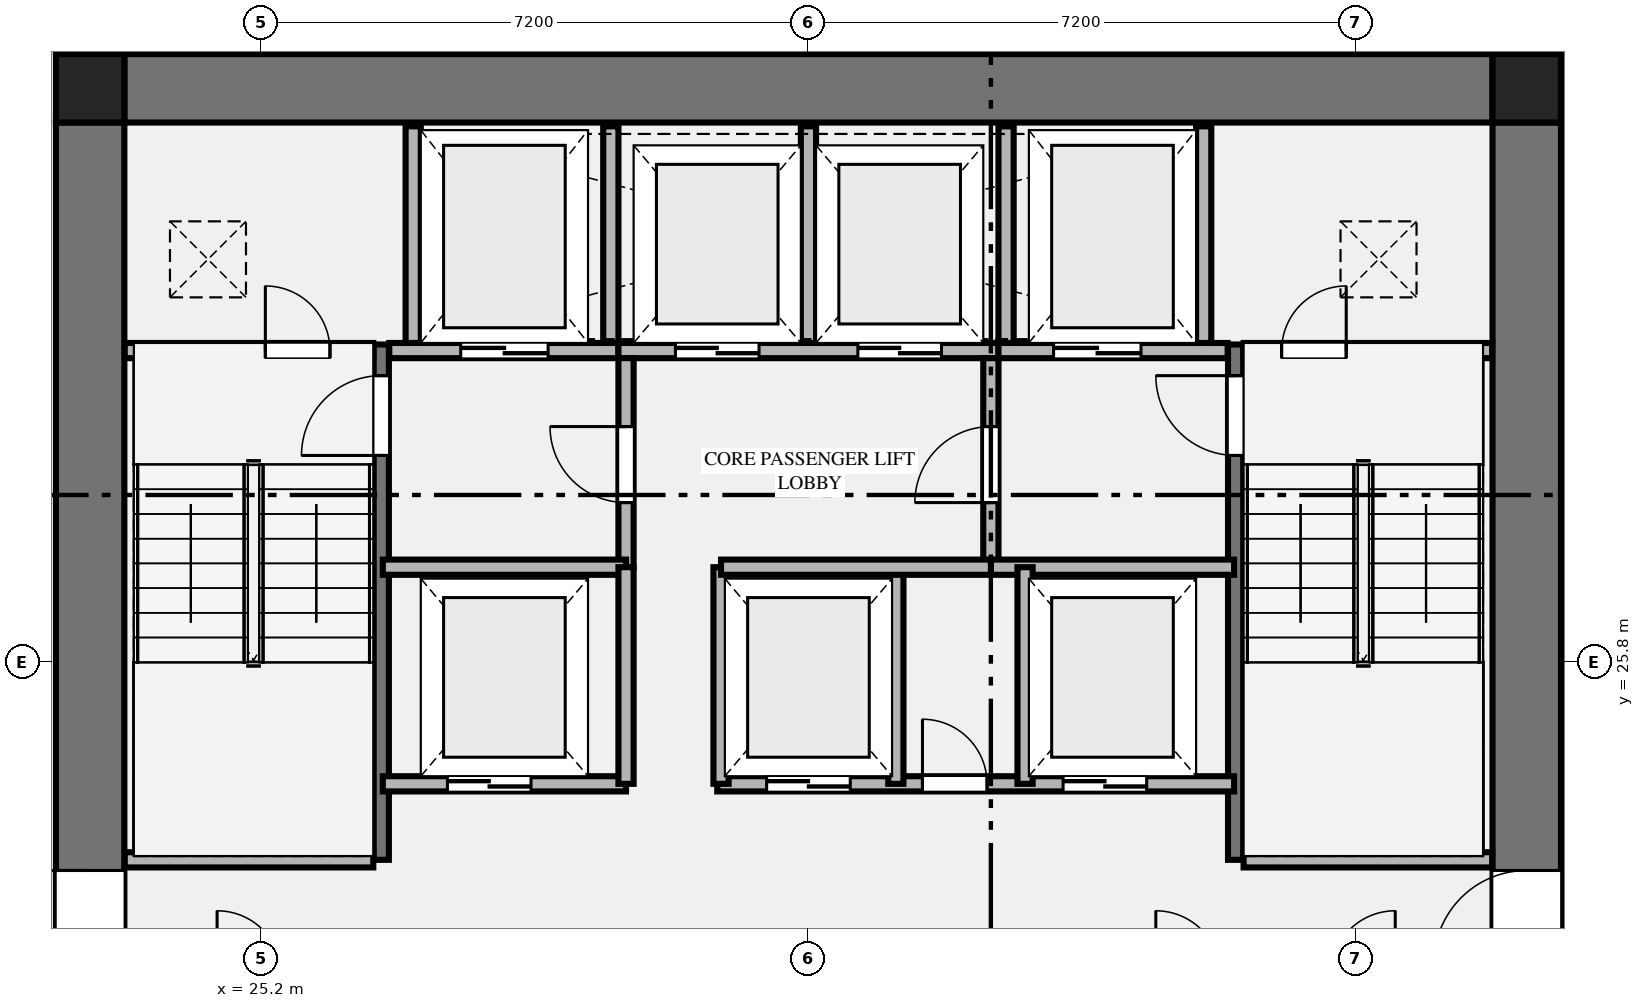
"""IFC4 building model, lengths in metres.
Left out: names, types, materials, properties, quantities, classifications, styles, units other than length and angle.
Written with IfcOpenShell. Run it as: python <this file> out.ifc"""

import sys

from ifc_helpers import new_model, si_unit, direction, frame, frame_2d, origin, origin_2d, place, context, subcontext, project, spatial, rectangle, extrude, element, fill, save


model = new_model("IFC4")
c1 = context("Model", 3, precision=1e-05, world=origin(), true_north=direction((0.0, 1.0)))
c2 = subcontext(c1, "Body", "Model", "MODEL_VIEW")
j1 = project(units=[si_unit("LENGTHUNIT", "METRE"), si_unit("PLANEANGLEUNIT", "RADIAN")], contexts=[c1])
p1 = place(None, origin())
s1 = spatial("IfcSite", under=j1, at=p1, CompositionType="ELEMENT")
p2 = place(p1, origin())
s2 = spatial("IfcBuilding", under=s1, at=p2, CompositionType="ELEMENT")
p3 = place(p2, origin())
s3 = spatial("IfcBuildingStorey", under=s2, at=p3, CompositionType="ELEMENT", Elevation=0.0)
for number, where, z_axis, x_axis in (
    (1, (41.85, 33.35, 0.0), (0.0, 0.0, 1.0), (1.0, 0.0, 0.0)),
    (2, (22.95, 33.35, 0.0), (0.0, 0.0, 1.0), (1.0, 0.0, 0.0)),
):
    element("IfcColumn", number, at=place(p3, frame(where, z_axis=z_axis, x_axis=x_axis)), inside=s3, PredefinedType="COLUMN", context=c2, shape_type="SweptSolid", body=[
        extrude(rectangle(XDim=0.9, YDim=0.9, at=origin_2d()), origin(), (0.0, 0.0, 1.0), 6.0),
    ])
p4 = place(p3, frame((23.4, 33.35, 0.0), z_axis=(0.0, 0.0, 1.0), x_axis=(1.0, 0.0, 0.0)))
e3 = element("IfcWall", 3, at=p4, inside=s3, PredefinedType="SHEAR", context=c2, shape_type="SweptSolid", body=[
    extrude(rectangle(XDim=18.0, YDim=0.9, at=frame_2d((9.0, 0.0))), origin(), (0.0, 0.0, 1.0), 5.75),
])
p5 = place(p3, frame((22.95, 18.9, 0.0), z_axis=(0.0, 0.0, 1.0), x_axis=(0.0, 1.0, 0.0)))
e4 = element("IfcWall", 4, at=p5, inside=s3, PredefinedType="SHEAR", context=c2, shape_type="SweptSolid", body=[
    extrude(rectangle(XDim=14.0, YDim=0.9, at=frame_2d((7.0, 0.0))), origin(), (0.0, 0.0, 1.0), 5.75),
])
p6 = place(p5, frame((2.94, 0.0, 0.0)))
e5 = element("IfcOpeningElement", 5, at=p6, cuts=e4, PredefinedType="OPENING", context=c2, shape_type="SweptSolid", body=[
    extrude(rectangle(XDim=1.22, YDim=2.25, at=frame_2d((0.61, 1.125))), frame((0.0, 0.46, 0.0), z_axis=(0.0, -1.0, 0.0), x_axis=(1.0, 0.0, 0.0)), (0.0, 0.0, 1.0), 0.92),
])
p7 = place(p3, frame((41.85, 18.9, 0.0), z_axis=(0.0, 0.0, 1.0), x_axis=(0.0, 1.0, 0.0)))
e6 = element("IfcWall", 6, at=p7, inside=s3, PredefinedType="SHEAR", context=c2, shape_type="SweptSolid", body=[
    extrude(rectangle(XDim=14.0, YDim=0.9, at=frame_2d((7.0, 0.0))), origin(), (0.0, 0.0, 1.0), 5.75),
])
p8 = place(p7, frame((2.94, 0.0, 0.0)))
e7 = element("IfcOpeningElement", 7, at=p8, cuts=e6, PredefinedType="OPENING", context=c2, shape_type="SweptSolid", body=[
    extrude(rectangle(XDim=1.22, YDim=2.25, at=frame_2d((0.61, 1.125))), frame((0.0, 0.46, 0.0), z_axis=(0.0, -1.0, 0.0), x_axis=(1.0, 0.0, 0.0)), (0.0, 0.0, 1.0), 0.92),
])
p9 = place(p3, frame((26.78, 23.2, 0.0), z_axis=(0.0, 0.0, 1.0), x_axis=(0.0, 1.0, 0.0)))
e8 = element("IfcWall", 8, at=p9, inside=s3, PredefinedType="SHEAR", context=c2, shape_type="SweptSolid", body=[
    extrude(rectangle(XDim=6.78, YDim=0.2, at=frame_2d((3.39, 0.0))), origin(), (0.0, 0.0, 1.0), 6.0),
])
p10 = place(p9, frame((5.32, 0.0, 0.0)))
e9 = element("IfcOpeningElement", 9, at=p10, cuts=e8, PredefinedType="OPENING", context=c2, shape_type="SweptSolid", body=[
    extrude(rectangle(XDim=1.05, YDim=2.15, at=frame_2d((0.525, 1.075))), frame((0.0, 0.11, 0.0), z_axis=(0.0, -1.0, 0.0), x_axis=(1.0, 0.0, 0.0)), (0.0, 0.0, 1.0), 0.22),
])
p11 = place(p3, frame((23.405, 23.2, 0.0), z_axis=(0.0, 0.0, 1.0), x_axis=(1.0, 0.0, 0.0)))
e10 = element("IfcWall", 10, at=p11, inside=s3, PredefinedType="PLUMBINGWALL", context=c2, shape_type="SweptSolid", body=[
    extrude(rectangle(XDim=3.27, YDim=0.2, at=frame_2d((1.635, 0.0))), origin(), (0.0, 0.0, 1.0), 5.75),
])
p12 = place(p3, frame((38.02, 23.2, 0.0), z_axis=(0.0, 0.0, 1.0), x_axis=(0.0, 1.0, 0.0)))
e11 = element("IfcWall", 11, at=p12, inside=s3, PredefinedType="SHEAR", context=c2, shape_type="SweptSolid", body=[
    extrude(rectangle(XDim=6.78, YDim=0.2, at=frame_2d((3.39, 0.0))), origin(), (0.0, 0.0, 1.0), 6.0),
])
p13 = place(p12, frame((5.32, 0.0, 0.0)))
e12 = element("IfcOpeningElement", 12, at=p13, cuts=e11, PredefinedType="OPENING", context=c2, shape_type="SweptSolid", body=[
    extrude(rectangle(XDim=1.05, YDim=2.15, at=frame_2d((0.525, 1.075))), frame((0.0, 0.11, 0.0), z_axis=(0.0, -1.0, 0.0), x_axis=(1.0, 0.0, 0.0)), (0.0, 0.0, 1.0), 0.22),
])
p14 = place(p3, frame((38.125, 23.2, 0.0), z_axis=(0.0, 0.0, 1.0), x_axis=(1.0, 0.0, 0.0)))
e13 = element("IfcWall", 13, at=p14, inside=s3, PredefinedType="PLUMBINGWALL", context=c2, shape_type="SweptSolid", body=[
    extrude(rectangle(XDim=3.27, YDim=0.2, at=frame_2d((1.635, 0.0))), origin(), (0.0, 0.0, 1.0), 5.75),
])
p15 = place(p3, frame((23.405, 29.9, 0.0), z_axis=(0.0, 0.0, 1.0), x_axis=(1.0, 0.0, 0.0)))
e14 = element("IfcWall", 14, at=p15, inside=s3, PredefinedType="PLUMBINGWALL", context=c2, shape_type="SweptSolid", body=[
    extrude(rectangle(XDim=3.27, YDim=0.2, at=frame_2d((1.635, 0.0))), origin(), (0.0, 0.0, 1.0), 5.75),
])
p16 = place(p15, frame((1.85, 0.0, 0.0)))
e15 = element("IfcOpeningElement", 15, at=p16, cuts=e14, PredefinedType="OPENING", context=c2, shape_type="SweptSolid", body=[
    extrude(rectangle(XDim=0.85, YDim=2.05, at=frame_2d((0.425, 1.025))), frame((0.0, 0.11, 0.0), z_axis=(0.0, -1.0, 0.0), x_axis=(1.0, 0.0, 0.0)), (0.0, 0.0, 1.0), 0.22),
])
p17 = place(p3, frame((26.885, 29.9, 0.0), z_axis=(0.0, 0.0, 1.0), x_axis=(1.0, 0.0, 0.0)))
e16 = element("IfcWall", 16, at=p17, inside=s3, PredefinedType="PLUMBINGWALL", context=c2, shape_type="SweptSolid", body=[
    extrude(rectangle(XDim=3.015, YDim=0.2, at=frame_2d((1.507, 0.0))), origin(), (0.0, 0.0, 1.0), 5.75),
])
p18 = place(p17, frame((0.94, 0.0, 0.0)))
e17 = element("IfcOpeningElement", 17, at=p18, cuts=e16, PredefinedType="OPENING", context=c2, shape_type="SweptSolid", body=[
    extrude(rectangle(XDim=1.15, YDim=2.2, at=frame_2d((0.575, 1.1))), frame((0.0, 0.11, 0.0), z_axis=(0.0, -1.0, 0.0), x_axis=(1.0, 0.0, 0.0)), (0.0, 0.0, 1.0), 0.22),
])
p19 = place(p3, frame((29.9, 29.9, 0.0), z_axis=(0.0, 0.0, 1.0), x_axis=(1.0, 0.0, 0.0)))
e18 = element("IfcWall", 18, at=p19, inside=s3, PredefinedType="PLUMBINGWALL", context=c2, shape_type="SweptSolid", body=[
    extrude(rectangle(XDim=5.0, YDim=0.2, at=frame_2d((2.5, 0.0))), origin(), (0.0, 0.0, 1.0), 5.75),
])
p20 = place(p19, frame((0.75, 0.0, 0.0)))
e19 = element("IfcOpeningElement", 19, at=p20, cuts=e18, PredefinedType="OPENING", context=c2, shape_type="SweptSolid", body=[
    extrude(rectangle(XDim=1.1, YDim=2.2, at=frame_2d((0.55, 1.1))), frame((0.0, 0.11, 0.0), z_axis=(0.0, -1.0, 0.0), x_axis=(1.0, 0.0, 0.0)), (0.0, 0.0, 1.0), 0.22),
])
p21 = place(p19, frame((3.15, 0.0, 0.0)))
e20 = element("IfcOpeningElement", 20, at=p21, cuts=e18, PredefinedType="OPENING", context=c2, shape_type="SweptSolid", body=[
    extrude(rectangle(XDim=1.1, YDim=2.2, at=frame_2d((0.55, 1.1))), frame((0.0, 0.11, 0.0), z_axis=(0.0, -1.0, 0.0), x_axis=(1.0, 0.0, 0.0)), (0.0, 0.0, 1.0), 0.22),
])
p22 = place(p3, frame((34.9, 29.9, 0.0), z_axis=(0.0, 0.0, 1.0), x_axis=(1.0, 0.0, 0.0)))
e21 = element("IfcWall", 21, at=p22, inside=s3, PredefinedType="PLUMBINGWALL", context=c2, shape_type="SweptSolid", body=[
    extrude(rectangle(XDim=3.015, YDim=0.2, at=frame_2d((1.508, 0.0))), origin(), (0.0, 0.0, 1.0), 5.75),
])
p23 = place(p22, frame((0.725, 0.0, 0.0)))
e22 = element("IfcOpeningElement", 22, at=p23, cuts=e21, PredefinedType="OPENING", context=c2, shape_type="SweptSolid", body=[
    extrude(rectangle(XDim=1.15, YDim=2.2, at=frame_2d((0.575, 1.1))), frame((0.0, 0.11, 0.0), z_axis=(0.0, -1.0, 0.0), x_axis=(1.0, 0.0, 0.0)), (0.0, 0.0, 1.0), 0.22),
])
p24 = place(p3, frame((38.125, 29.9, 0.0), z_axis=(0.0, 0.0, 1.0), x_axis=(1.0, 0.0, 0.0)))
e23 = element("IfcWall", 23, at=p24, inside=s3, PredefinedType="PLUMBINGWALL", context=c2, shape_type="SweptSolid", body=[
    extrude(rectangle(XDim=3.27, YDim=0.2, at=frame_2d((1.635, 0.0))), origin(), (0.0, 0.0, 1.0), 5.75),
])
p25 = place(p24, frame((0.5, 0.0, 0.0)))
e24 = element("IfcOpeningElement", 24, at=p25, cuts=e23, PredefinedType="OPENING", context=c2, shape_type="SweptSolid", body=[
    extrude(rectangle(XDim=0.85, YDim=2.05, at=frame_2d((0.425, 1.025))), frame((0.0, 0.11, 0.0), z_axis=(0.0, -1.0, 0.0), x_axis=(1.0, 0.0, 0.0)), (0.0, 0.0, 1.0), 0.22),
])
for number, where, z_axis, x_axis in (
    (25, (27.2, 30.0, 0.0), (0.0, 0.0, 1.0), (0.0, 1.0, 0.0)),
    (26, (29.8, 30.0, 0.0), (0.0, 0.0, 1.0), (0.0, 1.0, 0.0)),
    (27, (32.4, 30.0, 0.0), (0.0, 0.0, 1.0), (0.0, 1.0, 0.0)),
    (28, (35.0, 30.0, 0.0), (0.0, 0.0, 1.0), (0.0, 1.0, 0.0)),
    (29, (37.6, 30.0, 0.0), (0.0, 0.0, 1.0), (0.0, 1.0, 0.0)),
):
    element("IfcWall", number, at=place(p3, frame(where, z_axis=z_axis, x_axis=x_axis)), inside=s3, PredefinedType="PLUMBINGWALL", context=c2, shape_type="SweptSolid", body=[
        extrude(rectangle(XDim=2.85, YDim=0.2, at=frame_2d((1.425, 0.0))), origin(), (0.0, 0.0, 1.0), 5.75),
    ])
p26 = place(p3, frame((30.0, 27.05, 0.0), z_axis=(0.0, 0.0, 1.0), x_axis=(0.0, 1.0, 0.0)))
e30 = element("IfcWall", 30, at=p26, inside=s3, PredefinedType="PLUMBINGWALL", context=c2, shape_type="SweptSolid", body=[
    extrude(rectangle(XDim=2.75, YDim=0.2, at=frame_2d((1.375, 0.0))), origin(), (0.0, 0.0, 1.0), 5.75),
])
p27 = place(p26, frame((0.85, 0.0, 0.0)))
e31 = element("IfcOpeningElement", 31, at=p27, cuts=e30, PredefinedType="OPENING", context=c2, shape_type="SweptSolid", body=[
    extrude(rectangle(XDim=1.0, YDim=2.15, at=frame_2d((0.5, 1.075))), frame((0.0, 0.11, 0.0), z_axis=(0.0, -1.0, 0.0), x_axis=(1.0, 0.0, 0.0)), (0.0, 0.0, 1.0), 0.22),
])
p28 = place(p3, frame((26.8, 27.05, 0.0), z_axis=(0.0, 0.0, 1.0), x_axis=(1.0, 0.0, 0.0)))
e32 = element("IfcWall", 32, at=p28, inside=s3, PredefinedType="PLUMBINGWALL", context=c2, shape_type="SweptSolid", body=[
    extrude(rectangle(XDim=3.2, YDim=0.2, at=frame_2d((1.6, 0.0))), origin(), (0.0, 0.0, 1.0), 5.75),
])
p29 = place(p3, frame((34.8, 27.05, 0.0), z_axis=(0.0, 0.0, 1.0), x_axis=(0.0, 1.0, 0.0)))
e33 = element("IfcWall", 33, at=p29, inside=s3, PredefinedType="PLUMBINGWALL", context=c2, shape_type="SweptSolid", body=[
    extrude(rectangle(XDim=2.75, YDim=0.2, at=frame_2d((1.375, 0.0))), origin(), (0.0, 0.0, 1.0), 5.75),
])
p30 = place(p29, frame((0.85, 0.0, 0.0)))
e34 = element("IfcOpeningElement", 34, at=p30, cuts=e33, PredefinedType="OPENING", context=c2, shape_type="SweptSolid", body=[
    extrude(rectangle(XDim=1.0, YDim=2.15, at=frame_2d((0.5, 1.075))), frame((0.0, 0.11, 0.0), z_axis=(0.0, -1.0, 0.0), x_axis=(1.0, 0.0, 0.0)), (0.0, 0.0, 1.0), 0.22),
])
p31 = place(p3, frame((34.8, 27.05, 0.0), z_axis=(0.0, 0.0, 1.0), x_axis=(1.0, 0.0, 0.0)))
e35 = element("IfcWall", 35, at=p31, inside=s3, PredefinedType="PLUMBINGWALL", context=c2, shape_type="SweptSolid", body=[
    extrude(rectangle(XDim=3.2, YDim=0.2, at=frame_2d((1.6, 0.0))), origin(), (0.0, 0.0, 1.0), 5.75),
])
p32 = place(p3, frame((26.8, 24.2, 0.0), z_axis=(0.0, 0.0, 1.0), x_axis=(1.0, 0.0, 0.0)))
e36 = element("IfcWall", 36, at=p32, inside=s3, PredefinedType="PLUMBINGWALL", context=c2, shape_type="SweptSolid", body=[
    extrude(rectangle(XDim=3.2, YDim=0.2, at=frame_2d((1.6, 0.0))), origin(), (0.0, 0.0, 1.0), 5.75),
])
p33 = place(p32, frame((0.85, 0.0, 0.0)))
e37 = element("IfcOpeningElement", 37, at=p33, cuts=e36, PredefinedType="OPENING", context=c2, shape_type="SweptSolid", body=[
    extrude(rectangle(XDim=1.1, YDim=2.2, at=frame_2d((0.55, 1.1))), frame((0.0, 0.11, 0.0), z_axis=(0.0, -1.0, 0.0), x_axis=(1.0, 0.0, 0.0)), (0.0, 0.0, 1.0), 0.22),
])
p34 = place(p3, frame((30.0, 24.2, 0.0), z_axis=(0.0, 0.0, 1.0), x_axis=(0.0, 1.0, 0.0)))
e38 = element("IfcWall", 38, at=p34, inside=s3, PredefinedType="PLUMBINGWALL", context=c2, shape_type="SweptSolid", body=[
    extrude(rectangle(XDim=2.85, YDim=0.2, at=frame_2d((1.425, 0.0))), origin(), (0.0, 0.0, 1.0), 5.75),
])
p35 = place(p3, frame((31.2, 24.2, 0.0), z_axis=(0.0, 0.0, 1.0), x_axis=(1.0, 0.0, 0.0)))
e39 = element("IfcWall", 39, at=p35, inside=s3, PredefinedType="PLUMBINGWALL", context=c2, shape_type="SweptSolid", body=[
    extrude(rectangle(XDim=6.8, YDim=0.2, at=frame_2d((3.4, 0.0))), origin(), (0.0, 0.0, 1.0), 5.75),
])
p36 = place(p35, frame((0.65, 0.0, 0.0)))
e40 = element("IfcOpeningElement", 40, at=p36, cuts=e39, PredefinedType="OPENING", context=c2, shape_type="SweptSolid", body=[
    extrude(rectangle(XDim=1.1, YDim=2.2, at=frame_2d((0.55, 1.1))), frame((0.0, 0.11, 0.0), z_axis=(0.0, -1.0, 0.0), x_axis=(1.0, 0.0, 0.0)), (0.0, 0.0, 1.0), 0.22),
])
p37 = place(p35, frame((2.7, 0.0, 0.0)))
e41 = element("IfcOpeningElement", 41, at=p37, cuts=e39, PredefinedType="OPENING", context=c2, shape_type="SweptSolid", body=[
    extrude(rectangle(XDim=0.85, YDim=2.05, at=frame_2d((0.425, 1.025))), frame((0.0, 0.11, 0.0), z_axis=(0.0, -1.0, 0.0), x_axis=(1.0, 0.0, 0.0)), (0.0, 0.0, 1.0), 0.22),
])
p38 = place(p35, frame((4.55, 0.0, 0.0)))
e42 = element("IfcOpeningElement", 42, at=p38, cuts=e39, PredefinedType="OPENING", context=c2, shape_type="SweptSolid", body=[
    extrude(rectangle(XDim=1.1, YDim=2.2, at=frame_2d((0.55, 1.1))), frame((0.0, 0.11, 0.0), z_axis=(0.0, -1.0, 0.0), x_axis=(1.0, 0.0, 0.0)), (0.0, 0.0, 1.0), 0.22),
])
for number, where, z_axis, x_axis in (
    (43, (31.25, 24.2, 0.0), (0.0, 0.0, 1.0), (0.0, 1.0, 0.0)),
    (44, (33.55, 24.2, 0.0), (0.0, 0.0, 1.0), (0.0, 1.0, 0.0)),
    (45, (35.25, 24.2, 0.0), (0.0, 0.0, 1.0), (0.0, 1.0, 0.0)),
):
    element("IfcWall", number, at=place(p3, frame(where, z_axis=z_axis, x_axis=x_axis)), inside=s3, PredefinedType="PLUMBINGWALL", context=c2, shape_type="SweptSolid", body=[
        extrude(rectangle(XDim=2.85, YDim=0.2, at=frame_2d((1.425, 0.0))), origin(), (0.0, 0.0, 1.0), 5.75),
    ])
p39 = place(p3, frame((31.25, 27.05, 0.0), z_axis=(0.0, 0.0, 1.0), x_axis=(1.0, 0.0, 0.0)))
e46 = element("IfcWall", 46, at=p39, inside=s3, PredefinedType="PLUMBINGWALL", context=c2, shape_type="SweptSolid", body=[
    extrude(rectangle(XDim=3.55, YDim=0.2, at=frame_2d((1.775, 0.0))), origin(), (0.0, 0.0, 1.0), 5.75),
])
p40 = place(p6, origin())
e47 = element("IfcDoor", 47, at=p40, inside=s3, OperationType="SINGLE_SWING_RIGHT", PredefinedType="DOOR", context=c2, shape_type="SweptSolid", body=[
    extrude(rectangle(XDim=1.22, YDim=2.25, at=frame_2d((0.61, 1.125))), frame((0.0, 0.025, 0.0), z_axis=(0.0, -1.0, 0.0), x_axis=(1.0, 0.0, 0.0)), (0.0, 0.0, 1.0), 0.05),
])
fill(e5, e47)
p41 = place(p8, origin())
e48 = element("IfcDoor", 48, at=p41, inside=s3, OperationType="SINGLE_SWING_LEFT", PredefinedType="DOOR", context=c2, shape_type="SweptSolid", body=[
    extrude(rectangle(XDim=1.22, YDim=2.25, at=frame_2d((0.61, 1.125))), frame((0.0, 0.025, 0.0), z_axis=(0.0, -1.0, 0.0), x_axis=(1.0, 0.0, 0.0)), (0.0, 0.0, 1.0), 0.05),
])
fill(e7, e48)
p42 = place(p10, origin())
e49 = element("IfcDoor", 49, at=p42, inside=s3, OperationType="SINGLE_SWING_LEFT", PredefinedType="DOOR", context=c2, shape_type="SweptSolid", body=[
    extrude(rectangle(XDim=1.05, YDim=2.15, at=frame_2d((0.525, 1.075))), frame((0.0, 0.025, 0.0), z_axis=(0.0, -1.0, 0.0), x_axis=(1.0, 0.0, 0.0)), (0.0, 0.0, 1.0), 0.05),
])
fill(e9, e49)
p43 = place(p13, origin())
e50 = element("IfcDoor", 50, at=p43, inside=s3, OperationType="SINGLE_SWING_RIGHT", PredefinedType="DOOR", context=c2, shape_type="SweptSolid", body=[
    extrude(rectangle(XDim=1.05, YDim=2.15, at=frame_2d((0.525, 1.075))), frame((0.0, 0.025, 0.0), z_axis=(0.0, -1.0, 0.0), x_axis=(1.0, 0.0, 0.0)), (0.0, 0.0, 1.0), 0.05),
])
fill(e12, e50)
p44 = place(p16, origin())
e51 = element("IfcDoor", 51, at=p44, inside=s3, OperationType="SINGLE_SWING_LEFT", PredefinedType="DOOR", context=c2, shape_type="SweptSolid", body=[
    extrude(rectangle(XDim=0.85, YDim=2.05, at=frame_2d((0.425, 1.025))), frame((0.0, 0.025, 0.0), z_axis=(0.0, -1.0, 0.0), x_axis=(1.0, 0.0, 0.0)), (0.0, 0.0, 1.0), 0.05),
])
fill(e15, e51)
p45 = place(p25, origin())
e52 = element("IfcDoor", 52, at=p45, inside=s3, OperationType="SINGLE_SWING_RIGHT", PredefinedType="DOOR", context=c2, shape_type="SweptSolid", body=[
    extrude(rectangle(XDim=0.85, YDim=2.05, at=frame_2d((0.425, 1.025))), frame((0.0, 0.025, 0.0), z_axis=(0.0, -1.0, 0.0), x_axis=(1.0, 0.0, 0.0)), (0.0, 0.0, 1.0), 0.05),
])
fill(e24, e52)
p46 = place(p18, origin())
e53 = element("IfcDoor", 53, at=p46, inside=s3, OperationType="DOUBLE_DOOR_SLIDING", PredefinedType="DOOR", context=c2, shape_type="SweptSolid", body=[
    extrude(rectangle(XDim=1.15, YDim=2.2, at=frame_2d((0.575, 1.1))), frame((0.0, 0.025, 0.0), z_axis=(0.0, -1.0, 0.0), x_axis=(1.0, 0.0, 0.0)), (0.0, 0.0, 1.0), 0.05),
])
fill(e17, e53)
p47 = place(p23, origin())
e54 = element("IfcDoor", 54, at=p47, inside=s3, OperationType="DOUBLE_DOOR_SLIDING", PredefinedType="DOOR", context=c2, shape_type="SweptSolid", body=[
    extrude(rectangle(XDim=1.15, YDim=2.2, at=frame_2d((0.575, 1.1))), frame((0.0, 0.025, 0.0), z_axis=(0.0, -1.0, 0.0), x_axis=(1.0, 0.0, 0.0)), (0.0, 0.0, 1.0), 0.05),
])
fill(e22, e54)
p48 = place(p20, origin())
e55 = element("IfcDoor", 55, at=p48, inside=s3, OperationType="DOUBLE_DOOR_SLIDING", PredefinedType="DOOR", context=c2, shape_type="SweptSolid", body=[
    extrude(rectangle(XDim=1.1, YDim=2.2, at=frame_2d((0.55, 1.1))), frame((0.0, 0.025, 0.0), z_axis=(0.0, -1.0, 0.0), x_axis=(1.0, 0.0, 0.0)), (0.0, 0.0, 1.0), 0.05),
])
fill(e19, e55)
p49 = place(p21, origin())
e56 = element("IfcDoor", 56, at=p49, inside=s3, OperationType="DOUBLE_DOOR_SLIDING", PredefinedType="DOOR", context=c2, shape_type="SweptSolid", body=[
    extrude(rectangle(XDim=1.1, YDim=2.2, at=frame_2d((0.55, 1.1))), frame((0.0, 0.025, 0.0), z_axis=(0.0, -1.0, 0.0), x_axis=(1.0, 0.0, 0.0)), (0.0, 0.0, 1.0), 0.05),
])
fill(e20, e56)
p50 = place(p27, origin())
e57 = element("IfcDoor", 57, at=p50, inside=s3, OperationType="SINGLE_SWING_RIGHT", PredefinedType="DOOR", context=c2, shape_type="SweptSolid", body=[
    extrude(rectangle(XDim=1.0, YDim=2.15, at=frame_2d((0.5, 1.075))), frame((0.0, 0.025, 0.0), z_axis=(0.0, -1.0, 0.0), x_axis=(1.0, 0.0, 0.0)), (0.0, 0.0, 1.0), 0.05),
])
fill(e31, e57)
p51 = place(p30, origin())
e58 = element("IfcDoor", 58, at=p51, inside=s3, OperationType="SINGLE_SWING_LEFT", PredefinedType="DOOR", context=c2, shape_type="SweptSolid", body=[
    extrude(rectangle(XDim=1.0, YDim=2.15, at=frame_2d((0.5, 1.075))), frame((0.0, 0.025, 0.0), z_axis=(0.0, -1.0, 0.0), x_axis=(1.0, 0.0, 0.0)), (0.0, 0.0, 1.0), 0.05),
])
fill(e34, e58)
p52 = place(p33, origin())
e59 = element("IfcDoor", 59, at=p52, inside=s3, OperationType="DOUBLE_DOOR_SLIDING", PredefinedType="DOOR", context=c2, shape_type="SweptSolid", body=[
    extrude(rectangle(XDim=1.1, YDim=2.2, at=frame_2d((0.55, 1.1))), frame((0.0, 0.025, 0.0), z_axis=(0.0, -1.0, 0.0), x_axis=(1.0, 0.0, 0.0)), (0.0, 0.0, 1.0), 0.05),
])
fill(e37, e59)
p53 = place(p36, origin())
e60 = element("IfcDoor", 60, at=p53, inside=s3, OperationType="DOUBLE_DOOR_SLIDING", PredefinedType="DOOR", context=c2, shape_type="SweptSolid", body=[
    extrude(rectangle(XDim=1.1, YDim=2.2, at=frame_2d((0.55, 1.1))), frame((0.0, 0.025, 0.0), z_axis=(0.0, -1.0, 0.0), x_axis=(1.0, 0.0, 0.0)), (0.0, 0.0, 1.0), 0.05),
])
fill(e40, e60)
p54 = place(p37, origin())
e61 = element("IfcDoor", 61, at=p54, inside=s3, OperationType="SINGLE_SWING_LEFT", PredefinedType="DOOR", context=c2, shape_type="SweptSolid", body=[
    extrude(rectangle(XDim=0.85, YDim=2.05, at=frame_2d((0.425, 1.025))), frame((0.0, 0.025, 0.0), z_axis=(0.0, -1.0, 0.0), x_axis=(1.0, 0.0, 0.0)), (0.0, 0.0, 1.0), 0.05),
])
fill(e41, e61)
p55 = place(p38, origin())
e62 = element("IfcDoor", 62, at=p55, inside=s3, OperationType="DOUBLE_DOOR_SLIDING", PredefinedType="DOOR", context=c2, shape_type="SweptSolid", body=[
    extrude(rectangle(XDim=1.1, YDim=2.2, at=frame_2d((0.55, 1.1))), frame((0.0, 0.025, 0.0), z_axis=(0.0, -1.0, 0.0), x_axis=(1.0, 0.0, 0.0)), (0.0, 0.0, 1.0), 0.05),
])
fill(e42, e62)
save(model, sys.argv[1])
